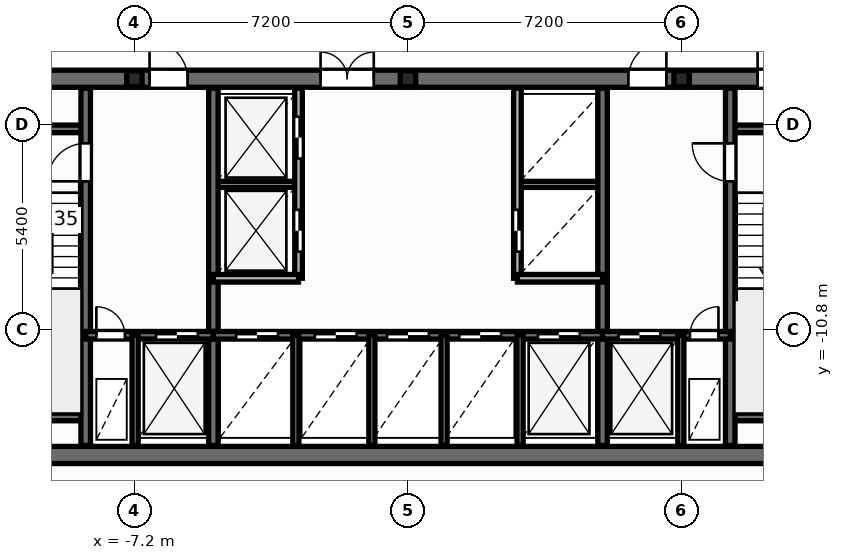
"""IFC4 building model, lengths in metres.
Left out: names, types, materials, properties, quantities, classifications, styles, units other than length and angle.
Written with IfcOpenShell. Run it as: python <this file> out.ifc"""

import sys

from ifc_helpers import new_model, si_unit, direction, frame, frame_2d, origin, origin_2d, place, context, subcontext, project, spatial, rectangle, i_section, extrude, element, fill, save


model = new_model("IFC4")
c1 = context("Model", 3, precision=1e-05, world=origin(), true_north=direction((0.0, 1.0)))
c2 = subcontext(c1, "Body", "Model", "MODEL_VIEW")
j1 = project(units=[si_unit("LENGTHUNIT", "METRE"), si_unit("PLANEANGLEUNIT", "RADIAN")], contexts=[c1])
p1 = place(None, origin())
s1 = spatial("IfcSite", under=j1, at=p1, CompositionType="ELEMENT")
p2 = place(p1, origin())
s2 = spatial("IfcBuilding", under=s1, at=p2, CompositionType="ELEMENT")
p3 = place(p2, frame((0.0, 0.0, 86.4)))
s3 = spatial("IfcBuildingStorey", under=s2, at=p3, CompositionType="ELEMENT", Elevation=86.4)
for number, where, z_axis, x_axis in (
    (1, (-7.2, -4.2, 0.0), (0.0, 0.0, 1.0), (1.0, 0.0, 0.0)),
    (2, (0.0, -4.2, 0.0), (0.0, 0.0, 1.0), (1.0, 0.0, 0.0)),
    (3, (7.2, -4.2, 0.0), (0.0, 0.0, 1.0), (1.0, 0.0, 0.0)),
):
    element("IfcColumn", number, at=place(p3, frame(where, z_axis=z_axis, x_axis=x_axis)), inside=s3, PredefinedType="PILASTER", context=c2, shape_type="SweptSolid", body=[
        extrude(i_section(OverallWidth=0.405, OverallDepth=0.414, WebThickness=0.022, FlangeThickness=0.032, at=origin_2d()), origin(), (0.0, 0.0, 1.0), 3.6),
    ])
for number, where, z_axis, x_axis in (
    (4, (-5.12, -6.98, 0.0), (0.0, 0.0, 1.0), (1.0, 0.0, 0.0)),
    (5, (2.88, -6.98, 0.0), (0.0, 0.0, 1.0), (1.0, 0.0, 0.0)),
):
    element("IfcWall", number, at=place(p3, frame(where, z_axis=z_axis, x_axis=x_axis)), inside=s3, PredefinedType="PARTITIONING", context=c2, shape_type="SweptSolid", body=[
        extrude(rectangle(XDim=2.24, YDim=0.16, at=frame_2d((1.12, 0.0))), origin(), (0.0, 0.0, 1.0), 3.28),
    ])
p4 = place(p3, frame((-12.65, -14.1, 0.0), z_axis=(0.0, 0.0, 1.0), x_axis=(1.0, 0.0, 0.0)))
e6 = element("IfcWall", 6, at=p4, inside=s3, PredefinedType="SHEAR", context=c2, shape_type="SweptSolid", body=[
    extrude(rectangle(XDim=25.3, YDim=0.45, at=frame_2d((12.65, 0.0))), origin(), (0.0, 0.0, 1.0), 3.6),
])
p5 = place(p3, frame((-12.65, -4.2, 0.0), z_axis=(0.0, 0.0, 1.0), x_axis=(1.0, 0.0, 0.0)))
e7 = element("IfcWall", 7, at=p5, inside=s3, PredefinedType="SHEAR", context=c2, shape_type="SweptSolid", body=[
    extrude(rectangle(XDim=25.3, YDim=0.45, at=frame_2d((12.65, 0.0))), origin(), (0.0, 0.0, 1.0), 3.6),
])
p6 = place(p5, frame((1.85, 0.0, 0.0)))
e8 = element("IfcOpeningElement", 8, at=p6, cuts=e7, PredefinedType="OPENING", context=c2, shape_type="SweptSolid", body=[
    extrude(rectangle(XDim=0.756, YDim=2.054, at=frame_2d((0.375, 1.027))), frame((0.0, 0.235, 0.0), z_axis=(0.0, -1.0, 0.0), x_axis=(1.0, 0.0, 0.0)), (0.0, 0.0, 1.0), 0.47),
])
p7 = place(p5, frame((21.85, 0.0, 0.0)))
e9 = element("IfcOpeningElement", 9, at=p7, cuts=e7, PredefinedType="OPENING", context=c2, shape_type="SweptSolid", body=[
    extrude(rectangle(XDim=0.756, YDim=2.054, at=frame_2d((0.375, 1.027))), frame((0.0, 0.235, 0.0), z_axis=(0.0, -1.0, 0.0), x_axis=(1.0, 0.0, 0.0)), (0.0, 0.0, 1.0), 0.47),
])
p8 = place(p5, frame((23.5, 0.0, 0.0)))
e10 = element("IfcOpeningElement", 10, at=p8, cuts=e7, PredefinedType="OPENING", context=c2, shape_type="SweptSolid", body=[
    extrude(rectangle(XDim=0.756, YDim=2.054, at=frame_2d((0.375, 1.027))), frame((0.0, 0.235, 0.0), z_axis=(0.0, -1.0, 0.0), x_axis=(1.0, 0.0, 0.0)), (0.0, 0.0, 1.0), 0.47),
])
p9 = place(p5, frame((5.85, 0.0, 0.0)))
e11 = element("IfcOpeningElement", 11, at=p9, cuts=e7, PredefinedType="OPENING", context=c2, shape_type="SweptSolid", body=[
    extrude(rectangle(XDim=1.006, YDim=2.104, at=frame_2d((0.5, 1.052))), frame((0.0, 0.235, 0.0), z_axis=(0.0, -1.0, 0.0), x_axis=(1.0, 0.0, 0.0)), (0.0, 0.0, 1.0), 0.47),
])
p10 = place(p5, frame((10.35, 0.0, 0.0)))
e12 = element("IfcOpeningElement", 12, at=p10, cuts=e7, PredefinedType="OPENING", context=c2, shape_type="SweptSolid", body=[
    extrude(rectangle(XDim=1.406, YDim=2.154, at=frame_2d((0.7, 1.077))), frame((0.0, 0.235, 0.0), z_axis=(0.0, -1.0, 0.0), x_axis=(1.0, 0.0, 0.0)), (0.0, 0.0, 1.0), 0.47),
])
p11 = place(p5, frame((18.45, 0.0, 0.0)))
e13 = element("IfcOpeningElement", 13, at=p11, cuts=e7, PredefinedType="OPENING", context=c2, shape_type="SweptSolid", body=[
    extrude(rectangle(XDim=1.006, YDim=2.104, at=frame_2d((0.5, 1.052))), frame((0.0, 0.235, 0.0), z_axis=(0.0, -1.0, 0.0), x_axis=(1.0, 0.0, 0.0)), (0.0, 0.0, 1.0), 0.47),
])
for number, where, z_axis, x_axis in (
    (14, (-12.35, -5.52, 0.0), (0.0, 0.0, 1.0), (1.0, 0.0, 0.0)),
    (15, (-12.35, -13.1, 0.0), (0.0, 0.0, 1.0), (1.0, 0.0, 0.0)),
    (16, (8.48, -5.52, 0.0), (0.0, 0.0, 1.0), (1.0, 0.0, 0.0)),
    (17, (8.48, -13.1, 0.0), (0.0, 0.0, 1.0), (1.0, 0.0, 0.0)),
):
    element("IfcWall", number, at=place(p3, frame(where, z_axis=z_axis, x_axis=x_axis)), inside=s3, PredefinedType="SOLIDWALL", context=c2, shape_type="SweptSolid", body=[
        extrude(rectangle(XDim=3.87, YDim=0.2, at=frame_2d((1.935, 0.0))), origin(), (0.0, 0.0, 1.0), 3.6),
    ])
p12 = place(p3, frame((-8.48, -13.85, 0.0), z_axis=(0.0, 0.0, 1.0), x_axis=(0.0, 1.0, 0.0)))
e18 = element("IfcWall", 18, at=p12, inside=s3, PredefinedType="SHEAR", context=c2, shape_type="SweptSolid", body=[
    extrude(rectangle(XDim=9.4, YDim=0.25, at=frame_2d((4.7, 0.0))), origin(), (0.0, 0.0, 1.0), 3.6),
])
p13 = place(p12, frame((6.95, 0.0, 0.0)))
e19 = element("IfcOpeningElement", 19, at=p13, cuts=e18, PredefinedType="OPENING", context=c2, shape_type="SweptSolid", body=[
    extrude(rectangle(XDim=1.006, YDim=2.104, at=frame_2d((0.5, 1.052))), frame((0.0, 0.135, 0.0), z_axis=(0.0, -1.0, 0.0), x_axis=(1.0, 0.0, 0.0)), (0.0, 0.0, 1.0), 0.27),
])
p14 = place(p3, frame((8.48, -13.85, 0.0), z_axis=(0.0, 0.0, 1.0), x_axis=(0.0, 1.0, 0.0)))
e20 = element("IfcWall", 20, at=p14, inside=s3, PredefinedType="SHEAR", context=c2, shape_type="SweptSolid", body=[
    extrude(rectangle(XDim=9.4, YDim=0.25, at=frame_2d((4.7, 0.0))), origin(), (0.0, 0.0, 1.0), 3.6),
])
p15 = place(p14, frame((6.95, 0.0, 0.0)))
e21 = element("IfcOpeningElement", 21, at=p15, cuts=e20, PredefinedType="OPENING", context=c2, shape_type="SweptSolid", body=[
    extrude(rectangle(XDim=1.006, YDim=2.104, at=frame_2d((0.5, 1.052))), frame((0.0, 0.135, 0.0), z_axis=(0.0, -1.0, 0.0), x_axis=(1.0, 0.0, 0.0)), (0.0, 0.0, 1.0), 0.27),
])
for number, where, z_axis, x_axis in (
    (22, (-5.12, -13.85, 0.0), (0.0, 0.0, 1.0), (0.0, 1.0, 0.0)),
    (23, (5.12, -13.85, 0.0), (0.0, 0.0, 1.0), (0.0, 1.0, 0.0)),
):
    element("IfcWall", number, at=place(p3, frame(where, z_axis=z_axis, x_axis=x_axis)), inside=s3, PredefinedType="SHEAR", context=c2, shape_type="SweptSolid", body=[
        extrude(rectangle(XDim=9.4, YDim=0.25, at=frame_2d((4.7, 0.0))), origin(), (0.0, 0.0, 1.0), 3.6),
    ])
p16 = place(p3, frame((-8.48, -10.95, 0.0), z_axis=(0.0, 0.0, 1.0), x_axis=(1.0, 0.0, 0.0)))
e24 = element("IfcWall", 24, at=p16, inside=s3, PredefinedType="SOLIDWALL", context=c2, shape_type="SweptSolid", body=[
    extrude(rectangle(XDim=3.36, YDim=0.2, at=frame_2d((1.68, 0.0))), origin(), (0.0, 0.0, 1.0), 3.6),
])
p17 = place(p16, frame((0.28, 0.0, 0.0)))
e25 = element("IfcOpeningElement", 25, at=p17, cuts=e24, PredefinedType="OPENING", context=c2, shape_type="SweptSolid", body=[
    extrude(rectangle(XDim=0.756, YDim=2.054, at=frame_2d((0.375, 1.027))), frame((0.0, 0.11, 0.0), z_axis=(0.0, -1.0, 0.0), x_axis=(1.0, 0.0, 0.0)), (0.0, 0.0, 1.0), 0.22),
])
p18 = place(p16, frame((1.85, 0.0, 0.0)))
e26 = element("IfcOpeningElement", 26, at=p18, cuts=e24, PredefinedType="OPENING", context=c2, shape_type="SweptSolid", body=[
    extrude(rectangle(XDim=1.106, YDim=2.104, at=frame_2d((0.55, 1.052))), frame((0.0, 0.11, 0.0), z_axis=(0.0, -1.0, 0.0), x_axis=(1.0, 0.0, 0.0)), (0.0, 0.0, 1.0), 0.22),
])
p19 = place(p3, frame((-5.12, -10.95, 0.0), z_axis=(0.0, 0.0, 1.0), x_axis=(1.0, 0.0, 0.0)))
e27 = element("IfcWall", 27, at=p19, inside=s3, PredefinedType="SOLIDWALL", context=c2, shape_type="SweptSolid", body=[
    extrude(rectangle(XDim=10.24, YDim=0.2, at=frame_2d((5.12, 0.0))), origin(), (0.0, 0.0, 1.0), 3.6),
])
p20 = place(p19, frame((0.6, 0.0, 0.0)))
e28 = element("IfcOpeningElement", 28, at=p20, cuts=e27, PredefinedType="OPENING", context=c2, shape_type="SweptSolid", body=[
    extrude(rectangle(XDim=1.106, YDim=2.104, at=frame_2d((0.55, 1.052))), frame((0.0, 0.11, 0.0), z_axis=(0.0, -1.0, 0.0), x_axis=(1.0, 0.0, 0.0)), (0.0, 0.0, 1.0), 0.22),
])
p21 = place(p19, frame((2.67, 0.0, 0.0)))
e29 = element("IfcOpeningElement", 29, at=p21, cuts=e27, PredefinedType="OPENING", context=c2, shape_type="SweptSolid", body=[
    extrude(rectangle(XDim=1.106, YDim=2.104, at=frame_2d((0.55, 1.052))), frame((0.0, 0.11, 0.0), z_axis=(0.0, -1.0, 0.0), x_axis=(1.0, 0.0, 0.0)), (0.0, 0.0, 1.0), 0.22),
])
p22 = place(p19, frame((4.57, 0.0, 0.0)))
e30 = element("IfcOpeningElement", 30, at=p22, cuts=e27, PredefinedType="OPENING", context=c2, shape_type="SweptSolid", body=[
    extrude(rectangle(XDim=1.106, YDim=2.104, at=frame_2d((0.55, 1.052))), frame((0.0, 0.11, 0.0), z_axis=(0.0, -1.0, 0.0), x_axis=(1.0, 0.0, 0.0)), (0.0, 0.0, 1.0), 0.22),
])
p23 = place(p19, frame((6.47, 0.0, 0.0)))
e31 = element("IfcOpeningElement", 31, at=p23, cuts=e27, PredefinedType="OPENING", context=c2, shape_type="SweptSolid", body=[
    extrude(rectangle(XDim=1.106, YDim=2.104, at=frame_2d((0.55, 1.052))), frame((0.0, 0.11, 0.0), z_axis=(0.0, -1.0, 0.0), x_axis=(1.0, 0.0, 0.0)), (0.0, 0.0, 1.0), 0.22),
])
p24 = place(p19, frame((8.54, 0.0, 0.0)))
e32 = element("IfcOpeningElement", 32, at=p24, cuts=e27, PredefinedType="OPENING", context=c2, shape_type="SweptSolid", body=[
    extrude(rectangle(XDim=1.106, YDim=2.104, at=frame_2d((0.55, 1.052))), frame((0.0, 0.11, 0.0), z_axis=(0.0, -1.0, 0.0), x_axis=(1.0, 0.0, 0.0)), (0.0, 0.0, 1.0), 0.22),
])
p25 = place(p3, frame((5.12, -10.95, 0.0), z_axis=(0.0, 0.0, 1.0), x_axis=(1.0, 0.0, 0.0)))
e33 = element("IfcWall", 33, at=p25, inside=s3, PredefinedType="SOLIDWALL", context=c2, shape_type="SweptSolid", body=[
    extrude(rectangle(XDim=3.36, YDim=0.2, at=frame_2d((1.68, 0.0))), origin(), (0.0, 0.0, 1.0), 3.6),
])
p26 = place(p25, frame((0.42, 0.0, 0.0)))
e34 = element("IfcOpeningElement", 34, at=p26, cuts=e33, PredefinedType="OPENING", context=c2, shape_type="SweptSolid", body=[
    extrude(rectangle(XDim=1.106, YDim=2.104, at=frame_2d((0.55, 1.052))), frame((0.0, 0.11, 0.0), z_axis=(0.0, -1.0, 0.0), x_axis=(1.0, 0.0, 0.0)), (0.0, 0.0, 1.0), 0.22),
])
p27 = place(p25, frame((2.3, 0.0, 0.0)))
e35 = element("IfcOpeningElement", 35, at=p27, cuts=e33, PredefinedType="OPENING", context=c2, shape_type="SweptSolid", body=[
    extrude(rectangle(XDim=0.756, YDim=2.054, at=frame_2d((0.375, 1.027))), frame((0.0, 0.11, 0.0), z_axis=(0.0, -1.0, 0.0), x_axis=(1.0, 0.0, 0.0)), (0.0, 0.0, 1.0), 0.22),
])
for number, where, z_axis, x_axis in (
    (36, (-7.18, -13.85, 0.0), (0.0, 0.0, 1.0), (0.0, 1.0, 0.0)),
    (37, (7.18, -13.85, 0.0), (0.0, 0.0, 1.0), (0.0, 1.0, 0.0)),
    (38, (-2.95, -13.85, 0.0), (0.0, 0.0, 1.0), (0.0, 1.0, 0.0)),
    (39, (2.95, -13.85, 0.0), (0.0, 0.0, 1.0), (0.0, 1.0, 0.0)),
):
    element("IfcWall", number, at=place(p3, frame(where, z_axis=z_axis, x_axis=x_axis)), inside=s3, PredefinedType="PARTITIONING", context=c2, shape_type="SweptSolid", body=[
        extrude(rectangle(XDim=2.9, YDim=0.16, at=frame_2d((1.45, 0.0))), origin(), (0.0, 0.0, 1.0), 2.305),
    ])
p28 = place(p3, frame((-2.88, -9.45, 0.0), z_axis=(0.0, 0.0, 1.0), x_axis=(0.0, 1.0, 0.0)))
e40 = element("IfcWall", 40, at=p28, inside=s3, PredefinedType="SOLIDWALL", context=c2, shape_type="SweptSolid", body=[
    extrude(rectangle(XDim=5.0, YDim=0.2, at=frame_2d((2.5, 0.0))), origin(), (0.0, 0.0, 1.0), 3.28),
])
p29 = place(p28, frame((0.7, 0.0, 0.0)))
e41 = element("IfcOpeningElement", 41, at=p29, cuts=e40, PredefinedType="OPENING", context=c2, shape_type="SweptSolid", body=[
    extrude(rectangle(XDim=1.106, YDim=2.104, at=frame_2d((0.55, 1.052))), frame((0.0, 0.11, 0.0), z_axis=(0.0, -1.0, 0.0), x_axis=(1.0, 0.0, 0.0)), (0.0, 0.0, 1.0), 0.22),
])
p30 = place(p28, frame((3.15, 0.0, 0.0)))
e42 = element("IfcOpeningElement", 42, at=p30, cuts=e40, PredefinedType="OPENING", context=c2, shape_type="SweptSolid", body=[
    extrude(rectangle(XDim=1.106, YDim=2.104, at=frame_2d((0.55, 1.052))), frame((0.0, 0.11, 0.0), z_axis=(0.0, -1.0, 0.0), x_axis=(1.0, 0.0, 0.0)), (0.0, 0.0, 1.0), 0.22),
])
p31 = place(p3, frame((-5.12, -9.45, 0.0), z_axis=(0.0, 0.0, 1.0), x_axis=(1.0, 0.0, 0.0)))
e43 = element("IfcWall", 43, at=p31, inside=s3, PredefinedType="SOLIDWALL", context=c2, shape_type="SweptSolid", body=[
    extrude(rectangle(XDim=2.24, YDim=0.2, at=frame_2d((1.12, 0.0))), origin(), (0.0, 0.0, 1.0), 3.28),
])
p32 = place(p3, frame((2.88, -9.45, 0.0), z_axis=(0.0, 0.0, 1.0), x_axis=(0.0, 1.0, 0.0)))
e44 = element("IfcWall", 44, at=p32, inside=s3, PredefinedType="SOLIDWALL", context=c2, shape_type="SweptSolid", body=[
    extrude(rectangle(XDim=5.0, YDim=0.2, at=frame_2d((2.5, 0.0))), origin(), (0.0, 0.0, 1.0), 3.28),
])
p33 = place(p32, frame((0.7, 0.0, 0.0)))
e45 = element("IfcOpeningElement", 45, at=p33, cuts=e44, PredefinedType="OPENING", context=c2, shape_type="SweptSolid", body=[
    extrude(rectangle(XDim=1.106, YDim=2.104, at=frame_2d((0.55, 1.052))), frame((0.0, 0.11, 0.0), z_axis=(0.0, -1.0, 0.0), x_axis=(1.0, 0.0, 0.0)), (0.0, 0.0, 1.0), 0.22),
])
p34 = place(p3, frame((2.88, -9.45, 0.0), z_axis=(0.0, 0.0, 1.0), x_axis=(1.0, 0.0, 0.0)))
e46 = element("IfcWall", 46, at=p34, inside=s3, PredefinedType="SOLIDWALL", context=c2, shape_type="SweptSolid", body=[
    extrude(rectangle(XDim=2.24, YDim=0.2, at=frame_2d((1.12, 0.0))), origin(), (0.0, 0.0, 1.0), 3.28),
])
for number, where, z_axis, x_axis in (
    (47, (-0.95, -13.85, 0.0), (0.0, 0.0, 1.0), (0.0, 1.0, 0.0)),
    (48, (0.95, -13.85, 0.0), (0.0, 0.0, 1.0), (0.0, 1.0, 0.0)),
):
    element("IfcWall", number, at=place(p3, frame(where, z_axis=z_axis, x_axis=x_axis)), inside=s3, PredefinedType="PARTITIONING", context=c2, shape_type="SweptSolid", body=[
        extrude(rectangle(XDim=2.9, YDim=0.16, at=frame_2d((1.45, 0.0))), origin(), (0.0, 0.0, 1.0), 2.305),
    ])
p35 = place(p29, origin())
e49 = element("IfcDoor", 49, at=p35, inside=s3, OperationType="DOUBLE_DOOR_SLIDING", PredefinedType="DOOR", context=c2, shape_type="SweptSolid", body=[
    extrude(rectangle(XDim=1.1, YDim=2.1, at=frame_2d((0.55, 1.05))), frame((0.0, 0.025, 0.0), z_axis=(0.0, -1.0, 0.0), x_axis=(1.0, 0.0, 0.0)), (0.0, 0.0, 1.0), 0.05),
])
fill(e41, e49)
p36 = place(p30, origin())
e50 = element("IfcDoor", 50, at=p36, inside=s3, OperationType="DOUBLE_DOOR_SLIDING", PredefinedType="DOOR", context=c2, shape_type="SweptSolid", body=[
    extrude(rectangle(XDim=1.1, YDim=2.1, at=frame_2d((0.55, 1.05))), frame((0.0, 0.025, 0.0), z_axis=(0.0, -1.0, 0.0), x_axis=(1.0, 0.0, 0.0)), (0.0, 0.0, 1.0), 0.05),
])
fill(e42, e50)
p37 = place(p33, origin())
e51 = element("IfcDoor", 51, at=p37, inside=s3, OperationType="DOUBLE_DOOR_SLIDING", PredefinedType="DOOR", context=c2, shape_type="SweptSolid", body=[
    extrude(rectangle(XDim=1.1, YDim=2.1, at=frame_2d((0.55, 1.05))), frame((0.0, 0.025, 0.0), z_axis=(0.0, -1.0, 0.0), x_axis=(1.0, 0.0, 0.0)), (0.0, 0.0, 1.0), 0.05),
])
fill(e45, e51)
p38 = place(p13, origin())
e52 = element("IfcDoor", 52, at=p38, inside=s3, OperationType="SINGLE_SWING_LEFT", PredefinedType="DOOR", context=c2, shape_type="SweptSolid", body=[
    extrude(rectangle(XDim=1.0, YDim=2.1, at=frame_2d((0.5, 1.05))), frame((0.0, 0.025, 0.0), z_axis=(0.0, -1.0, 0.0), x_axis=(1.0, 0.0, 0.0)), (0.0, 0.0, 1.0), 0.05),
])
fill(e19, e52)
p39 = place(p15, origin())
e53 = element("IfcDoor", 53, at=p39, inside=s3, OperationType="SINGLE_SWING_RIGHT", PredefinedType="DOOR", context=c2, shape_type="SweptSolid", body=[
    extrude(rectangle(XDim=1.0, YDim=2.1, at=frame_2d((0.5, 1.05))), frame((0.0, 0.025, 0.0), z_axis=(0.0, -1.0, 0.0), x_axis=(1.0, 0.0, 0.0)), (0.0, 0.0, 1.0), 0.05),
])
fill(e21, e53)
p40 = place(p17, origin())
e54 = element("IfcDoor", 54, at=p40, inside=s3, OperationType="SINGLE_SWING_LEFT", PredefinedType="DOOR", context=c2, shape_type="SweptSolid", body=[
    extrude(rectangle(XDim=0.75, YDim=2.05, at=frame_2d((0.375, 1.025))), frame((0.0, 0.025, 0.0), z_axis=(0.0, -1.0, 0.0), x_axis=(1.0, 0.0, 0.0)), (0.0, 0.0, 1.0), 0.05),
])
fill(e25, e54)
p41 = place(p18, origin())
e55 = element("IfcDoor", 55, at=p41, inside=s3, OperationType="DOUBLE_DOOR_SLIDING", PredefinedType="DOOR", context=c2, shape_type="SweptSolid", body=[
    extrude(rectangle(XDim=1.1, YDim=2.1, at=frame_2d((0.55, 1.05))), frame((0.0, 0.025, 0.0), z_axis=(0.0, -1.0, 0.0), x_axis=(1.0, 0.0, 0.0)), (0.0, 0.0, 1.0), 0.05),
])
fill(e26, e55)
p42 = place(p26, origin())
e56 = element("IfcDoor", 56, at=p42, inside=s3, OperationType="DOUBLE_DOOR_SLIDING", PredefinedType="DOOR", context=c2, shape_type="SweptSolid", body=[
    extrude(rectangle(XDim=1.1, YDim=2.1, at=frame_2d((0.55, 1.05))), frame((0.0, 0.025, 0.0), z_axis=(0.0, -1.0, 0.0), x_axis=(1.0, 0.0, 0.0)), (0.0, 0.0, 1.0), 0.05),
])
fill(e34, e56)
p43 = place(p27, origin())
e57 = element("IfcDoor", 57, at=p43, inside=s3, OperationType="SINGLE_SWING_RIGHT", PredefinedType="DOOR", context=c2, shape_type="SweptSolid", body=[
    extrude(rectangle(XDim=0.75, YDim=2.05, at=frame_2d((0.375, 1.025))), frame((0.0, 0.025, 0.0), z_axis=(0.0, -1.0, 0.0), x_axis=(1.0, 0.0, 0.0)), (0.0, 0.0, 1.0), 0.05),
])
fill(e35, e57)
p44 = place(p20, origin())
e58 = element("IfcDoor", 58, at=p44, inside=s3, OperationType="DOUBLE_DOOR_SLIDING", PredefinedType="DOOR", context=c2, shape_type="SweptSolid", body=[
    extrude(rectangle(XDim=1.1, YDim=2.1, at=frame_2d((0.55, 1.05))), frame((0.0, 0.025, 0.0), z_axis=(0.0, -1.0, 0.0), x_axis=(1.0, 0.0, 0.0)), (0.0, 0.0, 1.0), 0.05),
])
fill(e28, e58)
p45 = place(p21, origin())
e59 = element("IfcDoor", 59, at=p45, inside=s3, OperationType="DOUBLE_DOOR_SLIDING", PredefinedType="DOOR", context=c2, shape_type="SweptSolid", body=[
    extrude(rectangle(XDim=1.1, YDim=2.1, at=frame_2d((0.55, 1.05))), frame((0.0, 0.025, 0.0), z_axis=(0.0, -1.0, 0.0), x_axis=(1.0, 0.0, 0.0)), (0.0, 0.0, 1.0), 0.05),
])
fill(e29, e59)
p46 = place(p22, origin())
e60 = element("IfcDoor", 60, at=p46, inside=s3, OperationType="DOUBLE_DOOR_SLIDING", PredefinedType="DOOR", context=c2, shape_type="SweptSolid", body=[
    extrude(rectangle(XDim=1.1, YDim=2.1, at=frame_2d((0.55, 1.05))), frame((0.0, 0.025, 0.0), z_axis=(0.0, -1.0, 0.0), x_axis=(1.0, 0.0, 0.0)), (0.0, 0.0, 1.0), 0.05),
])
fill(e30, e60)
p47 = place(p23, origin())
e61 = element("IfcDoor", 61, at=p47, inside=s3, OperationType="DOUBLE_DOOR_SLIDING", PredefinedType="DOOR", context=c2, shape_type="SweptSolid", body=[
    extrude(rectangle(XDim=1.1, YDim=2.1, at=frame_2d((0.55, 1.05))), frame((0.0, 0.025, 0.0), z_axis=(0.0, -1.0, 0.0), x_axis=(1.0, 0.0, 0.0)), (0.0, 0.0, 1.0), 0.05),
])
fill(e31, e61)
p48 = place(p24, origin())
e62 = element("IfcDoor", 62, at=p48, inside=s3, OperationType="DOUBLE_DOOR_SLIDING", PredefinedType="DOOR", context=c2, shape_type="SweptSolid", body=[
    extrude(rectangle(XDim=1.1, YDim=2.1, at=frame_2d((0.55, 1.05))), frame((0.0, 0.025, 0.0), z_axis=(0.0, -1.0, 0.0), x_axis=(1.0, 0.0, 0.0)), (0.0, 0.0, 1.0), 0.05),
])
fill(e32, e62)
p49 = place(p7, origin())
e63 = element("IfcDoor", 63, at=p49, inside=s3, OperationType="SINGLE_SWING_LEFT", PredefinedType="DOOR", context=c2, shape_type="SweptSolid", body=[
    extrude(rectangle(XDim=0.75, YDim=2.05, at=frame_2d((0.375, 1.025))), frame((0.0, 0.025, 0.0), z_axis=(0.0, -1.0, 0.0), x_axis=(1.0, 0.0, 0.0)), (0.0, 0.0, 1.0), 0.05),
])
fill(e9, e63)
p50 = place(p9, origin())
e64 = element("IfcDoor", 64, at=p50, inside=s3, OperationType="SINGLE_SWING_LEFT", PredefinedType="DOOR", context=c2, shape_type="SweptSolid", body=[
    extrude(rectangle(XDim=1.0, YDim=2.1, at=frame_2d((0.5, 1.05))), frame((0.0, 0.025, 0.0), z_axis=(0.0, -1.0, 0.0), x_axis=(1.0, 0.0, 0.0)), (0.0, 0.0, 1.0), 0.05),
])
fill(e11, e64)
p51 = place(p10, origin())
e65 = element("IfcDoor", 65, at=p51, inside=s3, OperationType="DOUBLE_DOOR_SINGLE_SWING", PredefinedType="DOOR", context=c2, shape_type="SweptSolid", body=[
    extrude(rectangle(XDim=1.4, YDim=2.15, at=frame_2d((0.7, 1.075))), frame((0.0, 0.025, 0.0), z_axis=(0.0, -1.0, 0.0), x_axis=(1.0, 0.0, 0.0)), (0.0, 0.0, 1.0), 0.05),
])
fill(e12, e65)
p52 = place(p11, origin())
e66 = element("IfcDoor", 66, at=p52, inside=s3, OperationType="SINGLE_SWING_RIGHT", PredefinedType="DOOR", context=c2, shape_type="SweptSolid", body=[
    extrude(rectangle(XDim=1.0, YDim=2.1, at=frame_2d((0.5, 1.05))), frame((0.0, 0.025, 0.0), z_axis=(0.0, -1.0, 0.0), x_axis=(1.0, 0.0, 0.0)), (0.0, 0.0, 1.0), 0.05),
])
fill(e13, e66)
save(model, sys.argv[1])
